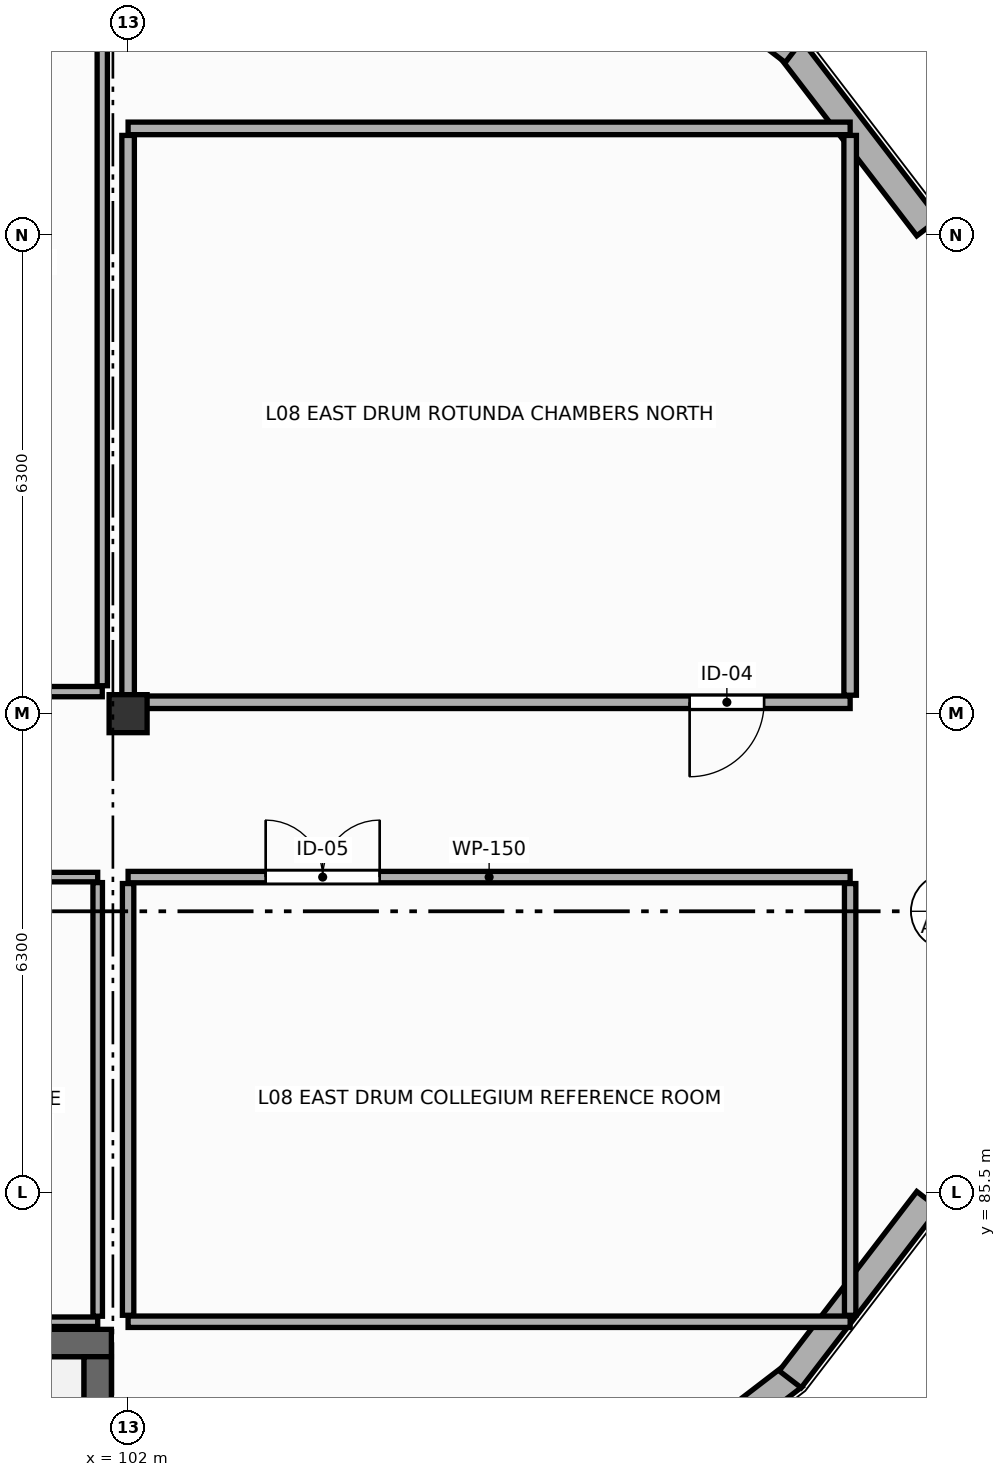
"""IFC4 building model, lengths in metres.
Left out: names, types, materials, properties, quantities, classifications, styles, units other than length and angle.
Written with IfcOpenShell. Run it as: python <this file> out.ifc"""

import sys

from ifc_helpers import new_model, si_unit, direction, frame, frame_2d, origin, origin_2d, place, context, subcontext, project, spatial, rectangle, extrude, element, fill, save


model = new_model("IFC4")
c1 = context("Model", 3, precision=1e-05, world=origin(), true_north=direction((0.0, 1.0)))
c2 = subcontext(c1, "Body", "Model", "MODEL_VIEW")
j1 = project(units=[si_unit("LENGTHUNIT", "METRE"), si_unit("PLANEANGLEUNIT", "RADIAN")], contexts=[c1])
p1 = place(None, origin())
s1 = spatial("IfcSite", under=j1, at=p1, CompositionType="ELEMENT")
p2 = place(p1, origin())
s2 = spatial("IfcBuilding", under=s1, at=p2, CompositionType="ELEMENT")
p3 = place(p2, frame((0.0, 0.0, 31.2)))
s3 = spatial("IfcBuildingStorey", under=s2, at=p3, CompositionType="ELEMENT", Elevation=31.2)
p4 = place(p3, frame((102.0, 91.8, 0.0), z_axis=(0.0, 0.0, 1.0), x_axis=(1.0, 0.0, 0.0)))
e1 = element("IfcColumn", 1, at=p4, inside=s3, PredefinedType="COLUMN", context=c2, shape_type="SweptSolid", body=[
    extrude(rectangle(XDim=0.5, YDim=0.5, at=origin_2d()), origin(), (0.0, 0.0, 1.0), 4.2),
])
p5 = place(p3, frame((108.398, 81.278, 0.0), z_axis=(0.0, 0.0, 1.0), x_axis=(0.793361877219, 0.608750303306, 0.0)))
e2 = element("IfcWall", 2, at=p5, inside=s3, PredefinedType="ELEMENTEDWALL", context=c2, shape_type="SweptSolid", body=[
    extrude(rectangle(XDim=2.974, YDim=0.365, at=frame_2d((1.487, 0.0))), origin(), (0.0, 0.0, 1.0), 3.01),
])
p6 = place(p5, frame((1.087, 0.0, 0.85)))
e3 = element("IfcOpeningElement", 3, at=p6, cuts=e2, PredefinedType="OPENING", context=c2, shape_type="SweptSolid", body=[
    extrude(rectangle(XDim=0.8, YDim=1.7, at=frame_2d((0.4, 0.85))), frame((0.0, 0.192, 0.0), z_axis=(0.0, -1.0, 0.0), x_axis=(1.0, 0.0, 0.0)), (0.0, 0.0, 1.0), 0.385),
])
p7 = place(p3, frame((110.711, 83.042, 0.0), z_axis=(0.0, 0.0, 1.0), x_axis=(0.608710660898, 0.793392293452, 0.0)))
e4 = element("IfcWall", 4, at=p7, inside=s3, PredefinedType="ELEMENTEDWALL", context=c2, shape_type="SweptSolid", body=[
    extrude(rectangle(XDim=2.974, YDim=0.365, at=frame_2d((1.487, 0.0))), origin(), (0.0, 0.0, 1.0), 3.11),
])
p8 = place(p3, frame((112.522, 98.198, 0.0), z_axis=(0.0, 0.0, 1.0), x_axis=(-0.608750303306, 0.793361877219, 0.0)))
e5 = element("IfcWall", 5, at=p8, inside=s3, PredefinedType="ELEMENTEDWALL", context=c2, shape_type="SweptSolid", body=[
    extrude(rectangle(XDim=2.974, YDim=0.365, at=frame_2d((1.487, 0.0))), origin(), (0.0, 0.0, 1.0), 3.11),
])
p9 = place(p3, frame((110.757, 100.511, 0.0), z_axis=(0.0, 0.0, 1.0), x_axis=(-0.793361877219, 0.608750303306, 0.0)))
e6 = element("IfcWall", 6, at=p9, inside=s3, PredefinedType="ELEMENTEDWALL", context=c2, shape_type="SweptSolid", body=[
    extrude(rectangle(XDim=2.974, YDim=0.365, at=frame_2d((1.487, 0.0))), origin(), (0.0, 0.0, 1.0), 3.01),
])
p10 = place(p9, frame((1.087, 0.0, 0.85)))
e7 = element("IfcOpeningElement", 7, at=p10, cuts=e6, PredefinedType="OPENING", context=c2, shape_type="SweptSolid", body=[
    extrude(rectangle(XDim=0.8, YDim=1.7, at=frame_2d((0.4, 0.85))), frame((0.0, 0.192, 0.0), z_axis=(0.0, -1.0, 0.0), x_axis=(1.0, 0.0, 0.0)), (0.0, 0.0, 1.0), 0.385),
])
p11 = place(p3, frame((92.42, 83.52, 0.0), z_axis=(0.0, 0.0, 1.0), x_axis=(1.0, 0.0, 0.0)))
e8 = element("IfcWall", 8, at=p11, inside=s3, PredefinedType="SHEAR", context=c2, shape_type="SweptSolid", body=[
    extrude(rectangle(XDim=9.36, YDim=0.36, at=frame_2d((4.68, 0.0))), origin(), (0.0, 0.0, 1.0), 3.98),
])
p12 = place(p3, frame((101.6, 83.34, 0.0), z_axis=(0.0, 0.0, 1.0), x_axis=(0.0, -1.0, 0.0)))
e9 = element("IfcWall", 9, at=p12, inside=s3, PredefinedType="SHEAR", context=c2, shape_type="SweptSolid", body=[
    extrude(rectangle(XDim=3.36, YDim=0.36, at=frame_2d((1.68, 0.0))), origin(), (0.0, 0.0, 1.0), 3.98),
])
p13 = place(p3, frame((99.1, 89.65, 0.0), z_axis=(0.0, 0.0, 1.0), x_axis=(1.0, 0.0, 0.0)))
e10 = element("IfcWall", 10, at=p13, inside=s3, PredefinedType="PARTITIONING", context=c2, shape_type="SweptSolid", body=[
    extrude(rectangle(XDim=2.5, YDim=0.125, at=frame_2d((1.25, 0.0))), origin(), (0.0, 0.0, 1.0), 3.11),
])
p14 = place(p13, frame((0.75, 0.0, 0.0)))
e11 = element("IfcOpeningElement", 11, at=p14, cuts=e10, PredefinedType="OPENING", context=c2, shape_type="SweptSolid", body=[
    extrude(rectangle(XDim=1.0, YDim=2.1, at=frame_2d((0.5, 1.05))), frame((0.0, 0.073, 0.0), z_axis=(0.0, -1.0, 0.0), x_axis=(1.0, 0.0, 0.0)), (0.0, 0.0, 1.0), 0.145),
])
p15 = place(p3, frame((101.6, 83.8, 0.0), z_axis=(0.0, 0.0, 1.0), x_axis=(-1.0, 0.0, 0.0)))
e12 = element("IfcWall", 12, at=p15, inside=s3, PredefinedType="PARTITIONING", context=c2, shape_type="SweptSolid", body=[
    extrude(rectangle(XDim=2.5, YDim=0.125, at=frame_2d((1.25, 0.0))), origin(), (0.0, 0.0, 1.0), 3.11),
])
p16 = place(p3, frame((101.6, 89.577, 0.0), z_axis=(0.0, 0.0, 1.0), x_axis=(0.0, -1.0, 0.0)))
e13 = element("IfcWall", 13, at=p16, inside=s3, PredefinedType="PARTITIONING", context=c2, shape_type="SweptSolid", body=[
    extrude(rectangle(XDim=5.705, YDim=0.125, at=frame_2d((2.853, 0.0))), origin(), (0.0, 0.0, 1.0), 3.11),
])
p17 = place(p3, frame((101.66, 92.09, 0.0), z_axis=(0.0, 0.0, 1.0), x_axis=(-1.0, 0.0, 0.0)))
e14 = element("IfcWall", 14, at=p17, inside=s3, PredefinedType="PARTITIONING", context=c2, shape_type="SweptSolid", body=[
    extrude(rectangle(XDim=3.663, YDim=0.135, at=frame_2d((1.832, 0.0))), origin(), (0.0, 0.0, 1.0), 3.11),
])
p18 = place(p17, frame((1.558, 0.0, 0.0)))
e15 = element("IfcOpeningElement", 15, at=p18, cuts=e14, PredefinedType="OPENING", context=c2, shape_type="SweptSolid", body=[
    extrude(rectangle(XDim=0.95, YDim=2.15, at=frame_2d((0.475, 1.075))), frame((0.0, 0.077, 0.0), z_axis=(0.0, -1.0, 0.0), x_axis=(1.0, 0.0, 0.0)), (0.0, 0.0, 1.0), 0.155),
])
p19 = place(p3, frame((101.66, 103.996, 0.0), z_axis=(0.0, 0.0, 1.0), x_axis=(0.0, -1.0, 0.0)))
e16 = element("IfcWall", 16, at=p19, inside=s3, PredefinedType="PARTITIONING", context=c2, shape_type="SweptSolid", body=[
    extrude(rectangle(XDim=11.829, YDim=0.135, at=frame_2d((5.914, 0.0))), origin(), (0.0, 0.0, 1.0), 3.11),
])
p20 = place(p3, frame((102.0, 99.5, 0.0), z_axis=(0.0, 0.0, 1.0), x_axis=(1.0, 0.0, 0.0)))
e17 = element("IfcWall", 17, at=p20, inside=s3, PredefinedType="PARTITIONING", context=c2, shape_type="SweptSolid", body=[
    extrude(rectangle(XDim=9.5, YDim=0.165, at=frame_2d((4.75, 0.0))), origin(), (0.0, 0.0, 1.0), 3.01),
])
p21 = place(p3, frame((111.5, 91.95, 0.0), z_axis=(0.0, 0.0, 1.0), x_axis=(-1.0, 0.0, 0.0)))
e18 = element("IfcWall", 18, at=p21, inside=s3, PredefinedType="PARTITIONING", context=c2, shape_type="SweptSolid", body=[
    extrude(rectangle(XDim=9.5, YDim=0.165, at=frame_2d((4.75, 0.0))), origin(), (0.0, 0.0, 1.0), 3.01),
])
p22 = place(p21, frame((1.132, 0.0, 0.0)))
e19 = element("IfcOpeningElement", 19, at=p22, cuts=e18, PredefinedType="OPENING", context=c2, shape_type="SweptSolid", body=[
    extrude(rectangle(XDim=0.98, YDim=2.2, at=frame_2d((0.49, 1.1))), frame((0.0, 0.093, 0.0), z_axis=(0.0, -1.0, 0.0), x_axis=(1.0, 0.0, 0.0)), (0.0, 0.0, 1.0), 0.185),
])
for number, where, z_axis, x_axis in (
    (20, (102.0, 92.042, 0.0), (0.0, 0.0, 1.0), (0.0, 1.0, 0.0)),
    (21, (111.5, 99.407, 0.0), (0.0, 0.0, 1.0), (0.0, -1.0, 0.0)),
):
    element("IfcWall", number, at=place(p3, frame(where, z_axis=z_axis, x_axis=x_axis)), inside=s3, PredefinedType="PARTITIONING", context=c2, shape_type="SweptSolid", body=[
        extrude(rectangle(XDim=7.365, YDim=0.165, at=frame_2d((3.683, 0.0))), origin(), (0.0, 0.0, 1.0), 3.11),
    ])
p23 = place(p3, frame((102.0, 89.65, 0.0), z_axis=(0.0, 0.0, 1.0), x_axis=(1.0, 0.0, 0.0)))
e22 = element("IfcWall", 22, at=p23, inside=s3, PredefinedType="PARTITIONING", context=c2, shape_type="SweptSolid", body=[
    extrude(rectangle(XDim=9.5, YDim=0.15, at=frame_2d((4.75, 0.0))), origin(), (0.0, 0.0, 1.0), 3.01),
])
p24 = place(p23, frame((1.81, 0.0, 0.0)))
e23 = element("IfcOpeningElement", 23, at=p24, cuts=e22, PredefinedType="OPENING", context=c2, shape_type="SweptSolid", body=[
    extrude(rectangle(XDim=1.5, YDim=2.35, at=frame_2d((0.75, 1.175))), frame((0.0, 0.085, 0.0), z_axis=(0.0, -1.0, 0.0), x_axis=(1.0, 0.0, 0.0)), (0.0, 0.0, 1.0), 0.17),
])
p25 = place(p3, frame((111.5, 83.8, 0.0), z_axis=(0.0, 0.0, 1.0), x_axis=(-1.0, 0.0, 0.0)))
e24 = element("IfcWall", 24, at=p25, inside=s3, PredefinedType="PARTITIONING", context=c2, shape_type="SweptSolid", body=[
    extrude(rectangle(XDim=9.5, YDim=0.15, at=frame_2d((4.75, 0.0))), origin(), (0.0, 0.0, 1.0), 3.01),
])
p26 = place(p3, frame((102.0, 83.885, 0.0), z_axis=(0.0, 0.0, 1.0), x_axis=(0.0, 1.0, 0.0)))
e25 = element("IfcWall", 25, at=p26, inside=s3, PredefinedType="PARTITIONING", context=c2, shape_type="SweptSolid", body=[
    extrude(rectangle(XDim=5.68, YDim=0.15, at=frame_2d((2.84, 0.0))), origin(), (0.0, 0.0, 1.0), 3.11),
])
p27 = place(p3, frame((111.5, 89.565, 0.0), z_axis=(0.0, 0.0, 1.0), x_axis=(0.0, -1.0, 0.0)))
e26 = element("IfcWall", 26, at=p27, inside=s3, PredefinedType="PARTITIONING", context=c2, shape_type="SweptSolid", body=[
    extrude(rectangle(XDim=5.68, YDim=0.15, at=frame_2d((2.84, 0.0))), origin(), (0.0, 0.0, 1.0), 3.61),
])
p28 = place(p22, origin())
e27 = element("IfcDoor", 27, at=p28, inside=s3, OperationType="SINGLE_SWING_RIGHT", PredefinedType="DOOR", context=c2, shape_type="SweptSolid", body=[
    extrude(rectangle(XDim=0.98, YDim=2.2, at=frame_2d((0.49, 1.1))), frame((0.0, 0.025, 0.0), z_axis=(0.0, -1.0, 0.0), x_axis=(1.0, 0.0, 0.0)), (0.0, 0.0, 1.0), 0.05),
])
fill(e19, e27)
p29 = place(p24, origin())
e28 = element("IfcDoor", 28, at=p29, inside=s3, OperationType="DOUBLE_DOOR_SINGLE_SWING", PredefinedType="DOOR", context=c2, shape_type="SweptSolid", body=[
    extrude(rectangle(XDim=1.5, YDim=2.35, at=frame_2d((0.75, 1.175))), frame((0.0, 0.025, 0.0), z_axis=(0.0, -1.0, 0.0), x_axis=(1.0, 0.0, 0.0)), (0.0, 0.0, 1.0), 0.05),
])
fill(e23, e28)
save(model, sys.argv[1])
